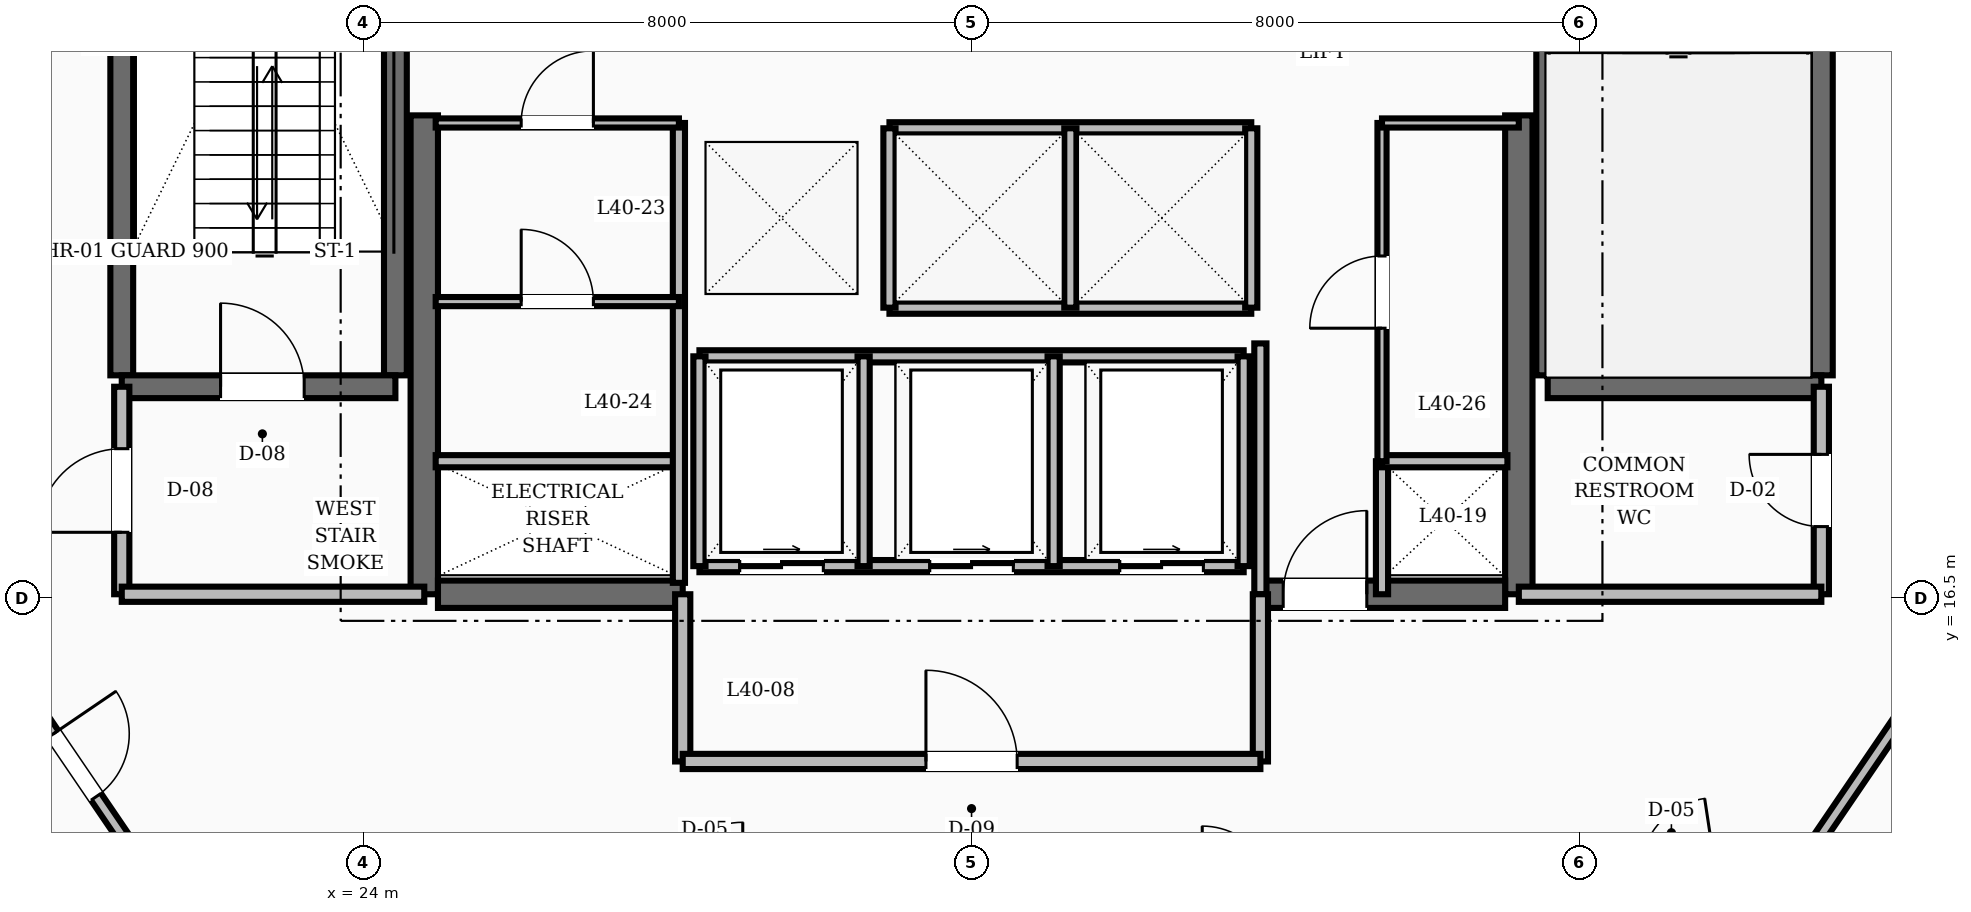
"""IFC4 building model, lengths in metres.
Left out: names, types, materials, properties, quantities, classifications, styles, units other than length and angle.
Written with IfcOpenShell. Run it as: python <this file> out.ifc"""

import sys

from ifc_helpers import new_model, si_unit, direction, frame, frame_2d, origin, place, context, subcontext, project, spatial, rectangle, extrude, element, fill, save


model = new_model("IFC4")
c1 = context("Model", 3, precision=1e-05, world=origin(), true_north=direction((0.0, 1.0)))
c2 = subcontext(c1, "Body", "Model", "MODEL_VIEW")
j1 = project(units=[si_unit("LENGTHUNIT", "METRE"), si_unit("PLANEANGLEUNIT", "RADIAN")], contexts=[c1])
p1 = place(None, origin())
s1 = spatial("IfcSite", under=j1, at=p1, CompositionType="ELEMENT")
p2 = place(p1, origin())
s2 = spatial("IfcBuilding", under=s1, at=p2, CompositionType="ELEMENT")
p3 = place(p2, frame((0.0, 0.0, 156.8)))
s3 = spatial("IfcBuildingStorey", under=s2, at=p3, CompositionType="ELEMENT", Elevation=156.8)
for number, where, z_axis, x_axis in (
    (1, (24.8, 16.55, 0.0), (0.0, 0.0, 1.0), (0.0, 1.0, 0.0)),
    (2, (39.2, 16.55, 0.0), (0.0, 0.0, 1.0), (0.0, 1.0, 0.0)),
):
    element("IfcWall", number, at=place(p3, frame(where, z_axis=z_axis, x_axis=x_axis)), inside=s3, PredefinedType="SHEAR", context=c2, shape_type="SweptSolid", body=[
        extrude(rectangle(XDim=6.3, YDim=0.36, at=frame_2d((3.15, 0.0))), origin(), (0.0, 0.0, 1.0), 3.6),
    ])
p4 = place(p3, frame((24.98, 16.55, 0.0), z_axis=(0.0, 0.0, 1.0), x_axis=(1.0, 0.0, 0.0)))
e3 = element("IfcWall", 3, at=p4, inside=s3, PredefinedType="SHEAR", context=c2, shape_type="SweptSolid", body=[
    extrude(rectangle(XDim=3.22, YDim=0.36, at=frame_2d((1.61, 0.0))), origin(), (0.0, 0.0, 1.0), 3.6),
])
p5 = place(p3, frame((35.8, 16.55, 0.0), z_axis=(0.0, 0.0, 1.0), x_axis=(1.0, 0.0, 0.0)))
e4 = element("IfcWall", 4, at=p5, inside=s3, PredefinedType="SHEAR", context=c2, shape_type="SweptSolid", body=[
    extrude(rectangle(XDim=3.22, YDim=0.36, at=frame_2d((1.61, 0.0))), origin(), (0.0, 0.0, 1.0), 3.6),
])
p6 = place(p5, frame((0.3, 0.0, 0.0)))
e5 = element("IfcOpeningElement", 5, at=p6, cuts=e4, PredefinedType="OPENING", context=c2, shape_type="SweptSolid", body=[
    extrude(rectangle(XDim=1.1, YDim=2.1, at=frame_2d((0.55, 1.05))), frame((0.0, 0.19, 0.0), z_axis=(0.0, -1.0, 0.0), x_axis=(1.0, 0.0, 0.0)), (0.0, 0.0, 1.0), 0.38),
])
for number, where, z_axis, x_axis in (
    (6, (20.82, 19.43, 0.0), (0.0, 0.0, 1.0), (0.0, 1.0, 0.0)),
    (7, (24.42, 19.43, 0.0), (0.0, 0.0, 1.0), (0.0, 1.0, 0.0)),
):
    element("IfcWall", number, at=place(p3, frame(where, z_axis=z_axis, x_axis=x_axis)), inside=s3, PredefinedType="SHEAR", context=c2, shape_type="SweptSolid", body=[
        extrude(rectangle(XDim=8.74, YDim=0.3, at=frame_2d((4.37, 0.0))), origin(), (0.0, 0.0, 1.0), 3.6),
    ])
p7 = place(p3, frame((20.82, 19.28, 0.0), z_axis=(0.0, 0.0, 1.0), x_axis=(1.0, 0.0, 0.0)))
e8 = element("IfcWall", 8, at=p7, inside=s3, PredefinedType="SHEAR", context=c2, shape_type="SweptSolid", body=[
    extrude(rectangle(XDim=3.6, YDim=0.3, at=frame_2d((1.8, 0.0))), origin(), (0.0, 0.0, 1.0), 3.6),
])
p8 = place(p7, frame((1.3, 0.0, 0.0)))
e9 = element("IfcOpeningElement", 9, at=p8, cuts=e8, PredefinedType="OPENING", context=c2, shape_type="SweptSolid", body=[
    extrude(rectangle(XDim=1.1, YDim=2.1, at=frame_2d((0.55, 1.05))), frame((0.0, 0.16, 0.0), z_axis=(0.0, -1.0, 0.0), x_axis=(1.0, 0.0, 0.0)), (0.0, 0.0, 1.0), 0.32),
])
for number, where, z_axis, x_axis in (
    (10, (43.18, 19.43, 0.0), (0.0, 0.0, 1.0), (0.0, 1.0, 0.0)),
    (11, (39.58, 19.43, 0.0), (0.0, 0.0, 1.0), (0.0, 1.0, 0.0)),
):
    element("IfcWall", number, at=place(p3, frame(where, z_axis=z_axis, x_axis=x_axis)), inside=s3, PredefinedType="SHEAR", context=c2, shape_type="SweptSolid", body=[
        extrude(rectangle(XDim=8.74, YDim=0.3, at=frame_2d((4.37, 0.0))), origin(), (0.0, 0.0, 1.0), 3.6),
    ])
p9 = place(p3, frame((39.58, 19.28, 0.0), z_axis=(0.0, 0.0, 1.0), x_axis=(1.0, 0.0, 0.0)))
e12 = element("IfcWall", 12, at=p9, inside=s3, PredefinedType="SHEAR", context=c2, shape_type="SweptSolid", body=[
    extrude(rectangle(XDim=3.6, YDim=0.3, at=frame_2d((1.8, 0.0))), origin(), (0.0, 0.0, 1.0), 3.6),
])
p10 = place(p3, frame((20.82, 16.55, 0.0), z_axis=(0.0, 0.0, 1.0), x_axis=(0.0, 1.0, 0.0)))
e13 = element("IfcWall", 13, at=p10, inside=s3, PredefinedType="SOLIDWALL", context=c2, shape_type="SweptSolid", body=[
    extrude(rectangle(XDim=2.73, YDim=0.2, at=frame_2d((1.365, 0.0))), origin(), (0.0, 0.0, 1.0), 2.8),
])
p11 = place(p10, frame((0.815, 0.0, 0.0)))
e14 = element("IfcOpeningElement", 14, at=p11, cuts=e13, PredefinedType="OPENING", context=c2, shape_type="SweptSolid", body=[
    extrude(rectangle(XDim=1.1, YDim=2.1, at=frame_2d((0.55, 1.05))), frame((0.0, 0.11, 0.0), z_axis=(0.0, -1.0, 0.0), x_axis=(1.0, 0.0, 0.0)), (0.0, 0.0, 1.0), 0.22),
])
p12 = place(p3, frame((20.82, 16.55, 0.0), z_axis=(0.0, 0.0, 1.0), x_axis=(1.0, 0.0, 0.0)))
e15 = element("IfcWall", 15, at=p12, inside=s3, PredefinedType="SOLIDWALL", context=c2, shape_type="SweptSolid", body=[
    extrude(rectangle(XDim=3.98, YDim=0.2, at=frame_2d((1.99, 0.0))), origin(), (0.0, 0.0, 1.0), 2.8),
])
p13 = place(p3, frame((43.18, 16.55, 0.0), z_axis=(0.0, 0.0, 1.0), x_axis=(0.0, 1.0, 0.0)))
e16 = element("IfcWall", 16, at=p13, inside=s3, PredefinedType="SOLIDWALL", context=c2, shape_type="SweptSolid", body=[
    extrude(rectangle(XDim=2.73, YDim=0.2, at=frame_2d((1.365, 0.0))), origin(), (0.0, 0.0, 1.0), 2.8),
])
p14 = place(p13, frame((0.89, 0.0, 0.0)))
e17 = element("IfcOpeningElement", 17, at=p14, cuts=e16, PredefinedType="OPENING", context=c2, shape_type="SweptSolid", body=[
    extrude(rectangle(XDim=0.95, YDim=2.1, at=frame_2d((0.475, 1.05))), frame((0.0, 0.11, 0.0), z_axis=(0.0, -1.0, 0.0), x_axis=(1.0, 0.0, 0.0)), (0.0, 0.0, 1.0), 0.22),
])
p15 = place(p3, frame((39.2, 16.55, 0.0), z_axis=(0.0, 0.0, 1.0), x_axis=(1.0, 0.0, 0.0)))
e18 = element("IfcWall", 18, at=p15, inside=s3, PredefinedType="SOLIDWALL", context=c2, shape_type="SweptSolid", body=[
    extrude(rectangle(XDim=3.98, YDim=0.2, at=frame_2d((1.99, 0.0))), origin(), (0.0, 0.0, 1.0), 2.8),
])
p16 = place(p3, frame((35.8, 16.55, 0.0), z_axis=(0.0, 0.0, 1.0), x_axis=(0.0, 1.0, 0.0)))
e19 = element("IfcWall", 19, at=p16, inside=s3, PredefinedType="SOLIDWALL", context=c2, shape_type="SweptSolid", body=[
    extrude(rectangle(XDim=3.3, YDim=0.16, at=frame_2d((1.65, 0.0))), origin(), (0.0, 0.0, 1.0), 2.8),
])
p17 = place(p3, frame((37.4, 16.55, 0.0), z_axis=(0.0, 0.0, 1.0), x_axis=(0.0, 1.0, 0.0)))
e20 = element("IfcWall", 20, at=p17, inside=s3, PredefinedType="SOLIDWALL", context=c2, shape_type="SweptSolid", body=[
    extrude(rectangle(XDim=1.75, YDim=0.16, at=frame_2d((0.875, 0.0))), origin(), (0.0, 0.0, 1.0), 2.8),
])
for number, where, z_axis, x_axis in (
    (21, (28.2, 14.35, 0.0), (0.0, 0.0, 1.0), (0.0, 1.0, 0.0)),
    (22, (35.8, 14.35, 0.0), (0.0, 0.0, 1.0), (0.0, 1.0, 0.0)),
):
    element("IfcWall", number, at=place(p3, frame(where, z_axis=z_axis, x_axis=x_axis)), inside=s3, PredefinedType="SOLIDWALL", context=c2, shape_type="SweptSolid", body=[
        extrude(rectangle(XDim=2.2, YDim=0.2, at=frame_2d((1.1, 0.0))), origin(), (0.0, 0.0, 1.0), 2.8),
    ])
p18 = place(p3, frame((28.2, 14.35, 0.0), z_axis=(0.0, 0.0, 1.0), x_axis=(1.0, 0.0, 0.0)))
e23 = element("IfcWall", 23, at=p18, inside=s3, PredefinedType="SOLIDWALL", context=c2, shape_type="SweptSolid", body=[
    extrude(rectangle(XDim=7.6, YDim=0.2, at=frame_2d((3.8, 0.0))), origin(), (0.0, 0.0, 1.0), 2.8),
])
p19 = place(p18, frame((3.2, 0.0, 0.0)))
e24 = element("IfcOpeningElement", 24, at=p19, cuts=e23, PredefinedType="OPENING", context=c2, shape_type="SweptSolid", body=[
    extrude(rectangle(XDim=1.2, YDim=2.1, at=frame_2d((0.6, 1.05))), frame((0.0, 0.11, 0.0), z_axis=(0.0, -1.0, 0.0), x_axis=(1.0, 0.0, 0.0)), (0.0, 0.0, 1.0), 0.22),
])
for number, where, z_axis, x_axis in (
    (25, (30.92, 22.68, 0.0), (0.0, 0.0, 1.0), (1.0, 0.0, 0.0)),
    (26, (30.92, 20.32, 0.0), (0.0, 0.0, 1.0), (1.0, 0.0, 0.0)),
):
    element("IfcWall", number, at=place(p3, frame(where, z_axis=z_axis, x_axis=x_axis)), inside=s3, PredefinedType="SOLIDWALL", context=c2, shape_type="SweptSolid", body=[
        extrude(rectangle(XDim=4.76, YDim=0.16, at=frame_2d((2.38, 0.0))), origin(), (0.0, 0.0, 1.0), 2.8),
    ])
for number, where, z_axis, x_axis in (
    (27, (30.92, 20.32, 0.0), (0.0, 0.0, 1.0), (0.0, 1.0, 0.0)),
    (28, (33.3, 20.32, 0.0), (0.0, 0.0, 1.0), (0.0, 1.0, 0.0)),
    (29, (35.68, 20.32, 0.0), (0.0, 0.0, 1.0), (0.0, 1.0, 0.0)),
):
    element("IfcWall", number, at=place(p3, frame(where, z_axis=z_axis, x_axis=x_axis)), inside=s3, PredefinedType="SOLIDWALL", context=c2, shape_type="SweptSolid", body=[
        extrude(rectangle(XDim=2.36, YDim=0.16, at=frame_2d((1.18, 0.0))), origin(), (0.0, 0.0, 1.0), 2.8),
    ])
p20 = place(p3, frame((28.42, 16.92, 0.0), z_axis=(0.0, 0.0, 1.0), x_axis=(1.0, 0.0, 0.0)))
e30 = element("IfcWall", 30, at=p20, inside=s3, PredefinedType="SOLIDWALL", context=c2, shape_type="SweptSolid", body=[
    extrude(rectangle(XDim=7.16, YDim=0.16, at=frame_2d((3.58, 0.0))), origin(), (0.0, 0.0, 1.0), 2.8),
])
p21 = place(p20, frame((0.53, 0.0, 0.0)))
e31 = element("IfcOpeningElement", 31, at=p21, cuts=e30, PredefinedType="OPENING", context=c2, shape_type="SweptSolid", body=[
    extrude(rectangle(XDim=1.1, YDim=2.15, at=frame_2d((0.55, 1.075))), frame((0.0, 0.09, 0.0), z_axis=(0.0, -1.0, 0.0), x_axis=(1.0, 0.0, 0.0)), (0.0, 0.0, 1.0), 0.18),
])
p22 = place(p20, frame((3.03, 0.0, 0.0)))
e32 = element("IfcOpeningElement", 32, at=p22, cuts=e30, PredefinedType="OPENING", context=c2, shape_type="SweptSolid", body=[
    extrude(rectangle(XDim=1.1, YDim=2.15, at=frame_2d((0.55, 1.075))), frame((0.0, 0.09, 0.0), z_axis=(0.0, -1.0, 0.0), x_axis=(1.0, 0.0, 0.0)), (0.0, 0.0, 1.0), 0.18),
])
p23 = place(p20, frame((5.53, 0.0, 0.0)))
e33 = element("IfcOpeningElement", 33, at=p23, cuts=e30, PredefinedType="OPENING", context=c2, shape_type="SweptSolid", body=[
    extrude(rectangle(XDim=1.1, YDim=2.15, at=frame_2d((0.55, 1.075))), frame((0.0, 0.09, 0.0), z_axis=(0.0, -1.0, 0.0), x_axis=(1.0, 0.0, 0.0)), (0.0, 0.0, 1.0), 0.18),
])
p24 = place(p3, frame((28.42, 19.68, 0.0), z_axis=(0.0, 0.0, 1.0), x_axis=(1.0, 0.0, 0.0)))
e34 = element("IfcWall", 34, at=p24, inside=s3, PredefinedType="SOLIDWALL", context=c2, shape_type="SweptSolid", body=[
    extrude(rectangle(XDim=7.16, YDim=0.16, at=frame_2d((3.58, 0.0))), origin(), (0.0, 0.0, 1.0), 2.8),
])
for number, where, z_axis, x_axis in (
    (35, (28.42, 16.92, 0.0), (0.0, 0.0, 1.0), (0.0, 1.0, 0.0)),
    (36, (30.58, 16.92, 0.0), (0.0, 0.0, 1.0), (0.0, 1.0, 0.0)),
    (37, (33.08, 16.92, 0.0), (0.0, 0.0, 1.0), (0.0, 1.0, 0.0)),
    (38, (35.58, 16.92, 0.0), (0.0, 0.0, 1.0), (0.0, 1.0, 0.0)),
):
    element("IfcWall", number, at=place(p3, frame(where, z_axis=z_axis, x_axis=x_axis)), inside=s3, PredefinedType="SOLIDWALL", context=c2, shape_type="SweptSolid", body=[
        extrude(rectangle(XDim=2.76, YDim=0.16, at=frame_2d((1.38, 0.0))), origin(), (0.0, 0.0, 1.0), 2.8),
    ])
p25 = place(p3, frame((24.95, 18.3, 0.0), z_axis=(0.0, 0.0, 1.0), x_axis=(1.0, 0.0, 0.0)))
e39 = element("IfcWall", 39, at=p25, inside=s3, PredefinedType="SOLIDWALL", context=c2, shape_type="SweptSolid", body=[
    extrude(rectangle(XDim=3.2, YDim=0.16, at=frame_2d((1.6, 0.0))), origin(), (0.0, 0.0, 1.0), 2.8),
])
p26 = place(p3, frame((28.15, 16.7, 0.0), z_axis=(0.0, 0.0, 1.0), x_axis=(0.0, 1.0, 0.0)))
e40 = element("IfcWall", 40, at=p26, inside=s3, PredefinedType="SOLIDWALL", context=c2, shape_type="SweptSolid", body=[
    extrude(rectangle(XDim=6.05, YDim=0.16, at=frame_2d((3.025, 0.0))), origin(), (0.0, 0.0, 1.0), 2.8),
])
p27 = place(p3, frame((37.4, 18.3, 0.0), z_axis=(0.0, 0.0, 1.0), x_axis=(1.0, 0.0, 0.0)))
e41 = element("IfcWall", 41, at=p27, inside=s3, PredefinedType="SOLIDWALL", context=c2, shape_type="SweptSolid", body=[
    extrude(rectangle(XDim=1.65, YDim=0.16, at=frame_2d((0.825, 0.0))), origin(), (0.0, 0.0, 1.0), 2.8),
])
p28 = place(p3, frame((24.95, 22.75, 0.0), z_axis=(0.0, 0.0, 1.0), x_axis=(1.0, 0.0, 0.0)))
e42 = element("IfcWall", 42, at=p28, inside=s3, PredefinedType="PARTITIONING", context=c2, shape_type="SweptSolid", body=[
    extrude(rectangle(XDim=3.2, YDim=0.12, at=frame_2d((1.6, 0.0))), origin(), (0.0, 0.0, 1.0), 2.8),
])
p29 = place(p28, frame((1.125, 0.0, 0.0)))
e43 = element("IfcOpeningElement", 43, at=p29, cuts=e42, PredefinedType="OPENING", context=c2, shape_type="SweptSolid", body=[
    extrude(rectangle(XDim=0.95, YDim=2.1, at=frame_2d((0.475, 1.05))), frame((0.0, 0.07, 0.0), z_axis=(0.0, -1.0, 0.0), x_axis=(1.0, 0.0, 0.0)), (0.0, 0.0, 1.0), 0.14),
])
p30 = place(p3, frame((37.4, 18.3, 0.0), z_axis=(0.0, 0.0, 1.0), x_axis=(0.0, 1.0, 0.0)))
e44 = element("IfcWall", 44, at=p30, inside=s3, PredefinedType="PARTITIONING", context=c2, shape_type="SweptSolid", body=[
    extrude(rectangle(XDim=4.45, YDim=0.12, at=frame_2d((2.225, 0.0))), origin(), (0.0, 0.0, 1.0), 2.8),
])
p31 = place(p30, frame((1.75, 0.0, 0.0)))
e45 = element("IfcOpeningElement", 45, at=p31, cuts=e44, PredefinedType="OPENING", context=c2, shape_type="SweptSolid", body=[
    extrude(rectangle(XDim=0.95, YDim=2.1, at=frame_2d((0.475, 1.05))), frame((0.0, 0.07, 0.0), z_axis=(0.0, -1.0, 0.0), x_axis=(1.0, 0.0, 0.0)), (0.0, 0.0, 1.0), 0.14),
])
p32 = place(p3, frame((37.4, 22.75, 0.0), z_axis=(0.0, 0.0, 1.0), x_axis=(1.0, 0.0, 0.0)))
e46 = element("IfcWall", 46, at=p32, inside=s3, PredefinedType="PARTITIONING", context=c2, shape_type="SweptSolid", body=[
    extrude(rectangle(XDim=1.8, YDim=0.12, at=frame_2d((0.9, 0.0))), origin(), (0.0, 0.0, 1.0), 2.8),
])
p33 = place(p3, frame((24.95, 20.4, 0.0), z_axis=(0.0, 0.0, 1.0), x_axis=(1.0, 0.0, 0.0)))
e47 = element("IfcWall", 47, at=p33, inside=s3, PredefinedType="PARTITIONING", context=c2, shape_type="SweptSolid", body=[
    extrude(rectangle(XDim=3.2, YDim=0.12, at=frame_2d((1.6, 0.0))), origin(), (0.0, 0.0, 1.0), 2.8),
])
p34 = place(p33, frame((1.125, 0.0, 0.0)))
e48 = element("IfcOpeningElement", 48, at=p34, cuts=e47, PredefinedType="OPENING", context=c2, shape_type="SweptSolid", body=[
    extrude(rectangle(XDim=0.95, YDim=2.1, at=frame_2d((0.475, 1.05))), frame((0.0, 0.07, 0.0), z_axis=(0.0, -1.0, 0.0), x_axis=(1.0, 0.0, 0.0)), (0.0, 0.0, 1.0), 0.14),
])
p35 = place(p3, frame((19.35, 15.548, 0.0), z_axis=(0.0, 0.0, 1.0), x_axis=(0.562674669208, -0.826678423955, 0.0)))
e49 = element("IfcWall", 49, at=p35, inside=s3, PredefinedType="SOLIDWALL", context=c2, shape_type="SweptSolid", body=[
    extrude(rectangle(XDim=3.021, YDim=0.16, at=frame_2d((1.511, 0.0))), origin(), (0.0, 0.0, 1.0), 2.8),
])
p36 = place(p35, frame((1.01, 0.0, 0.0)))
e50 = element("IfcOpeningElement", 50, at=p36, cuts=e49, PredefinedType="OPENING", context=c2, shape_type="SweptSolid", body=[
    extrude(rectangle(XDim=1.0, YDim=2.1, at=frame_2d((0.5, 1.05))), frame((0.0, 0.09, 0.0), z_axis=(0.0, -1.0, 0.0), x_axis=(1.0, 0.0, 0.0)), (0.0, 0.0, 1.0), 0.18),
])
p37 = place(p3, frame((42.95, 13.05, 0.0), z_axis=(0.0, 0.0, 1.0), x_axis=(0.562674669208, 0.826678423955, 0.0)))
e51 = element("IfcWall", 51, at=p37, inside=s3, PredefinedType="SOLIDWALL", context=c2, shape_type="SweptSolid", body=[
    extrude(rectangle(XDim=3.021, YDim=0.16, at=frame_2d((1.511, 0.0))), origin(), (0.0, 0.0, 1.0), 2.8),
])
p38 = place(p8, origin())
e52 = element("IfcDoor", 52, at=p38, inside=s3, OperationType="SINGLE_SWING_LEFT", PredefinedType="DOOR", context=c2, shape_type="SweptSolid", body=[
    extrude(rectangle(XDim=1.1, YDim=2.1, at=frame_2d((0.55, 1.05))), frame((0.0, 0.025, 0.0), z_axis=(0.0, -1.0, 0.0), x_axis=(1.0, 0.0, 0.0)), (0.0, 0.0, 1.0), 0.05),
])
fill(e9, e52)
p39 = place(p11, origin())
e53 = element("IfcDoor", 53, at=p39, inside=s3, OperationType="SINGLE_SWING_LEFT", PredefinedType="DOOR", context=c2, shape_type="SweptSolid", body=[
    extrude(rectangle(XDim=1.1, YDim=2.1, at=frame_2d((0.55, 1.05))), frame((0.0, 0.025, 0.0), z_axis=(0.0, -1.0, 0.0), x_axis=(1.0, 0.0, 0.0)), (0.0, 0.0, 1.0), 0.05),
])
fill(e14, e53)
p40 = place(p14, origin())
e54 = element("IfcDoor", 54, at=p40, inside=s3, OperationType="SINGLE_SWING_RIGHT", PredefinedType="DOOR", context=c2, shape_type="SweptSolid", body=[
    extrude(rectangle(XDim=0.95, YDim=2.1, at=frame_2d((0.475, 1.05))), frame((0.0, 0.025, 0.0), z_axis=(0.0, -1.0, 0.0), x_axis=(1.0, 0.0, 0.0)), (0.0, 0.0, 1.0), 0.05),
])
fill(e17, e54)
p41 = place(p6, origin())
e55 = element("IfcDoor", 55, at=p41, inside=s3, OperationType="SINGLE_SWING_RIGHT", PredefinedType="DOOR", context=c2, shape_type="SweptSolid", body=[
    extrude(rectangle(XDim=1.1, YDim=2.1, at=frame_2d((0.55, 1.05))), frame((0.0, 0.025, 0.0), z_axis=(0.0, -1.0, 0.0), x_axis=(1.0, 0.0, 0.0)), (0.0, 0.0, 1.0), 0.05),
])
fill(e5, e55)
p42 = place(p19, origin())
e56 = element("IfcDoor", 56, at=p42, inside=s3, OperationType="SINGLE_SWING_LEFT", PredefinedType="DOOR", context=c2, shape_type="SweptSolid", body=[
    extrude(rectangle(XDim=1.2, YDim=2.1, at=frame_2d((0.6, 1.05))), frame((0.0, 0.025, 0.0), z_axis=(0.0, -1.0, 0.0), x_axis=(1.0, 0.0, 0.0)), (0.0, 0.0, 1.0), 0.05),
])
fill(e24, e56)
p43 = place(p21, origin())
e57 = element("IfcDoor", 57, at=p43, inside=s3, OperationType="SLIDING_TO_RIGHT", PredefinedType="DOOR", context=c2, shape_type="SweptSolid", body=[
    extrude(rectangle(XDim=1.1, YDim=2.15, at=frame_2d((0.55, 1.075))), frame((0.0, 0.025, 0.0), z_axis=(0.0, -1.0, 0.0), x_axis=(1.0, 0.0, 0.0)), (0.0, 0.0, 1.0), 0.05),
])
fill(e31, e57)
p44 = place(p22, origin())
e58 = element("IfcDoor", 58, at=p44, inside=s3, OperationType="SLIDING_TO_RIGHT", PredefinedType="DOOR", context=c2, shape_type="SweptSolid", body=[
    extrude(rectangle(XDim=1.1, YDim=2.15, at=frame_2d((0.55, 1.075))), frame((0.0, 0.025, 0.0), z_axis=(0.0, -1.0, 0.0), x_axis=(1.0, 0.0, 0.0)), (0.0, 0.0, 1.0), 0.05),
])
fill(e32, e58)
p45 = place(p23, origin())
e59 = element("IfcDoor", 59, at=p45, inside=s3, OperationType="SLIDING_TO_RIGHT", PredefinedType="DOOR", context=c2, shape_type="SweptSolid", body=[
    extrude(rectangle(XDim=1.1, YDim=2.15, at=frame_2d((0.55, 1.075))), frame((0.0, 0.025, 0.0), z_axis=(0.0, -1.0, 0.0), x_axis=(1.0, 0.0, 0.0)), (0.0, 0.0, 1.0), 0.05),
])
fill(e33, e59)
p46 = place(p29, origin())
e60 = element("IfcDoor", 60, at=p46, inside=s3, OperationType="SINGLE_SWING_RIGHT", PredefinedType="DOOR", context=c2, shape_type="SweptSolid", body=[
    extrude(rectangle(XDim=0.95, YDim=2.1, at=frame_2d((0.475, 1.05))), frame((0.0, 0.025, 0.0), z_axis=(0.0, -1.0, 0.0), x_axis=(1.0, 0.0, 0.0)), (0.0, 0.0, 1.0), 0.05),
])
fill(e43, e60)
p47 = place(p34, origin())
e61 = element("IfcDoor", 61, at=p47, inside=s3, OperationType="SINGLE_SWING_LEFT", PredefinedType="DOOR", context=c2, shape_type="SweptSolid", body=[
    extrude(rectangle(XDim=0.95, YDim=2.1, at=frame_2d((0.475, 1.05))), frame((0.0, 0.025, 0.0), z_axis=(0.0, -1.0, 0.0), x_axis=(1.0, 0.0, 0.0)), (0.0, 0.0, 1.0), 0.05),
])
fill(e48, e61)
p48 = place(p31, origin())
e62 = element("IfcDoor", 62, at=p48, inside=s3, OperationType="SINGLE_SWING_LEFT", PredefinedType="DOOR", context=c2, shape_type="SweptSolid", body=[
    extrude(rectangle(XDim=0.95, YDim=2.1, at=frame_2d((0.475, 1.05))), frame((0.0, 0.025, 0.0), z_axis=(0.0, -1.0, 0.0), x_axis=(1.0, 0.0, 0.0)), (0.0, 0.0, 1.0), 0.05),
])
fill(e45, e62)
p49 = place(p36, origin())
e63 = element("IfcDoor", 63, at=p49, inside=s3, OperationType="SINGLE_SWING_LEFT", PredefinedType="DOOR", context=c2, shape_type="SweptSolid", body=[
    extrude(rectangle(XDim=1.0, YDim=2.1, at=frame_2d((0.5, 1.05))), frame((0.0, 0.025, 0.0), z_axis=(0.0, -1.0, 0.0), x_axis=(1.0, 0.0, 0.0)), (0.0, 0.0, 1.0), 0.05),
])
fill(e50, e63)
save(model, sys.argv[1])
